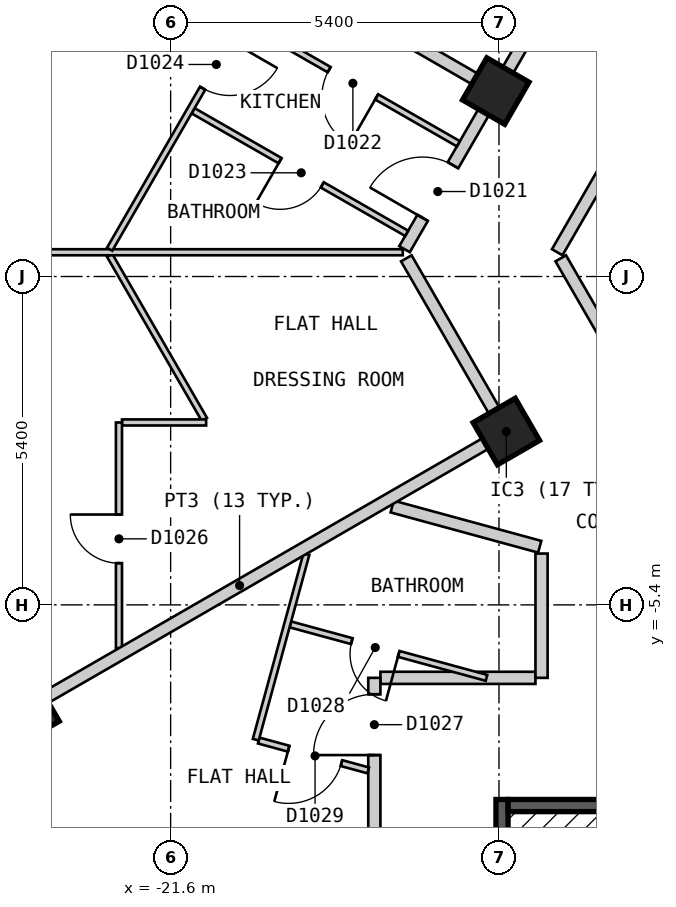
"""IFC4 building model, lengths in metres.
Left out: names, types, materials, properties, quantities, classifications, styles, units other than length and angle.
Written with IfcOpenShell. Run it as: python <this file> out.ifc"""

import sys

from ifc_helpers import new_model, si_unit, direction, frame, frame_2d, origin, origin_2d, place, context, subcontext, project, spatial, polyline, rectangle, outline, extrude, element, fill, save


model = new_model("IFC4")
c1 = context("Model", 3, precision=1e-05, world=origin(), true_north=direction((0.0, 1.0)))
c2 = subcontext(c1, "Body", "Model", "MODEL_VIEW")
j1 = project(units=[si_unit("LENGTHUNIT", "METRE"), si_unit("PLANEANGLEUNIT", "RADIAN")], contexts=[c1])
p1 = place(None, origin())
s1 = spatial("IfcSite", under=j1, at=p1, CompositionType="ELEMENT")
p2 = place(p1, origin())
s2 = spatial("IfcBuilding", under=s1, at=p2, CompositionType="ELEMENT")
p3 = place(p2, frame((0.0, 0.0, 120.6)))
s3 = spatial("IfcBuildingStorey", under=s2, at=p3, CompositionType="ELEMENT", Elevation=120.6)
p4 = place(p3, frame((-24.047, -7.149, 0.0), z_axis=(0.0, 0.0, 1.0), x_axis=(0.5, -0.866025403784, 0.0)))
e1 = element("IfcColumn", 1, at=p4, inside=s3, PredefinedType="COLUMN", context=c2, shape_type="SweptSolid", body=[
    extrude(rectangle(XDim=0.9, YDim=0.9, at=origin_2d()), origin(), (0.0, 0.0, 1.0), 3.0),
])
for number, where, z_axis, x_axis in (
    (2, (-16.079, -2.549, 0.0), (0.0, 0.0, 1.0), (0.5, -0.866, 0.0)),
    (3, (-16.253, 3.05, 0.0), (0.0, 0.0, 1.0), (-0.5, -0.866, 0.0)),
):
    element("IfcColumn", number, at=place(p3, frame(where, z_axis=z_axis, x_axis=x_axis)), inside=s3, PredefinedType="COLUMN", context=c2, shape_type="SweptSolid", body=[
        extrude(rectangle(XDim=0.8, YDim=0.8, at=origin_2d()), origin(), (0.0, 0.0, 1.0), 3.0),
    ])
p5 = place(p3, frame((-16.555, 23.025, 0.0), z_axis=(0.0, 0.0, 1.0), x_axis=(-0.500020536353, -0.866013546791, 0.0)))
e4 = element("IfcWall", 4, at=p5, inside=s3, PredefinedType="SOLIDWALL", context=c2, shape_type="SweptSolid", body=[
    extrude(outline(polyline([(0.0, -0.15), (23.325, -0.15), (23.245, 0.15), (0.08, 0.15), (0.0, -0.15)])), origin(), (0.0, 0.0, 1.0), 2.7),
])
p6 = place(p5, frame((1.314, 0.0, 0.15)))
e5 = element("IfcOpeningElement", 5, at=p6, cuts=e4, PredefinedType="OPENING", context=c2, shape_type="SweptSolid", body=[
    extrude(rectangle(XDim=1.5, YDim=2.1, at=frame_2d((0.75, 1.05))), frame((0.0, 0.16, 0.0), z_axis=(0.0, -1.0, 0.0), x_axis=(1.0, 0.0, 0.0)), (0.0, 0.0, 1.0), 0.32),
])
p7 = place(p5, frame((4.056, 0.0, 0.15)))
e6 = element("IfcOpeningElement", 6, at=p7, cuts=e4, PredefinedType="OPENING", context=c2, shape_type="SweptSolid", body=[
    extrude(rectangle(XDim=1.5, YDim=2.1, at=frame_2d((0.75, 1.05))), frame((0.0, 0.16, 0.0), z_axis=(0.0, -1.0, 0.0), x_axis=(1.0, 0.0, 0.0)), (0.0, 0.0, 1.0), 0.32),
])
p8 = place(p5, frame((6.799, 0.0, 0.15)))
e7 = element("IfcOpeningElement", 7, at=p8, cuts=e4, PredefinedType="OPENING", context=c2, shape_type="SweptSolid", body=[
    extrude(rectangle(XDim=1.5, YDim=2.1, at=frame_2d((0.75, 1.05))), frame((0.0, 0.16, 0.0), z_axis=(0.0, -1.0, 0.0), x_axis=(1.0, 0.0, 0.0)), (0.0, 0.0, 1.0), 0.32),
])
p9 = place(p5, frame((9.541, 0.0, 0.15)))
e8 = element("IfcOpeningElement", 8, at=p9, cuts=e4, PredefinedType="OPENING", context=c2, shape_type="SweptSolid", body=[
    extrude(rectangle(XDim=1.5, YDim=2.1, at=frame_2d((0.75, 1.05))), frame((0.0, 0.16, 0.0), z_axis=(0.0, -1.0, 0.0), x_axis=(1.0, 0.0, 0.0)), (0.0, 0.0, 1.0), 0.32),
])
p10 = place(p5, frame((12.285, 0.0, 0.15)))
e9 = element("IfcOpeningElement", 9, at=p10, cuts=e4, PredefinedType="OPENING", context=c2, shape_type="SweptSolid", body=[
    extrude(rectangle(XDim=1.5, YDim=2.1, at=frame_2d((0.75, 1.05))), frame((0.0, 0.16, 0.0), z_axis=(0.0, -1.0, 0.0), x_axis=(1.0, 0.0, 0.0)), (0.0, 0.0, 1.0), 0.32),
])
p11 = place(p5, frame((15.027, 0.0, 0.15)))
e10 = element("IfcOpeningElement", 10, at=p11, cuts=e4, PredefinedType="OPENING", context=c2, shape_type="SweptSolid", body=[
    extrude(rectangle(XDim=1.5, YDim=2.1, at=frame_2d((0.75, 1.05))), frame((0.0, 0.16, 0.0), z_axis=(0.0, -1.0, 0.0), x_axis=(1.0, 0.0, 0.0)), (0.0, 0.0, 1.0), 0.32),
])
p12 = place(p5, frame((17.769, 0.0, 0.15)))
e11 = element("IfcOpeningElement", 11, at=p12, cuts=e4, PredefinedType="OPENING", context=c2, shape_type="SweptSolid", body=[
    extrude(rectangle(XDim=1.5, YDim=2.1, at=frame_2d((0.75, 1.05))), frame((0.0, 0.16, 0.0), z_axis=(0.0, -1.0, 0.0), x_axis=(1.0, 0.0, 0.0)), (0.0, 0.0, 1.0), 0.32),
])
p13 = place(p5, frame((20.512, 0.0, 0.15)))
e12 = element("IfcOpeningElement", 12, at=p13, cuts=e4, PredefinedType="OPENING", context=c2, shape_type="SweptSolid", body=[
    extrude(rectangle(XDim=1.5, YDim=2.1, at=frame_2d((0.75, 1.05))), frame((0.0, 0.16, 0.0), z_axis=(0.0, -1.0, 0.0), x_axis=(1.0, 0.0, 0.0)), (0.0, 0.0, 1.0), 0.32),
])
p14 = place(p3, frame((-28.218, -2.025, 0.0), z_axis=(0.0, 0.0, 1.0), x_axis=(0.500017503135, -0.866015298109, 0.0)))
e13 = element("IfcWall", 13, at=p14, inside=s3, PredefinedType="SOLIDWALL", context=c2, shape_type="SweptSolid", body=[
    extrude(outline(polyline([(0.0, -0.15), (24.711, -0.15), (24.631, 0.15), (0.08, 0.15), (0.0, -0.15)])), origin(), (0.0, 0.0, 1.0), 2.7),
])
p15 = place(p14, frame((1.4, 0.0, 0.15)))
e14 = element("IfcOpeningElement", 14, at=p15, cuts=e13, PredefinedType="OPENING", context=c2, shape_type="SweptSolid", body=[
    extrude(rectangle(XDim=1.5, YDim=2.1, at=frame_2d((0.75, 1.05))), frame((0.0, 0.16, 0.0), z_axis=(0.0, -1.0, 0.0), x_axis=(1.0, 0.0, 0.0)), (0.0, 0.0, 1.0), 0.32),
])
p16 = place(p14, frame((4.316, 0.0, 0.15)))
e15 = element("IfcOpeningElement", 15, at=p16, cuts=e13, PredefinedType="OPENING", context=c2, shape_type="SweptSolid", body=[
    extrude(rectangle(XDim=1.5, YDim=2.1, at=frame_2d((0.75, 1.05))), frame((0.0, 0.16, 0.0), z_axis=(0.0, -1.0, 0.0), x_axis=(1.0, 0.0, 0.0)), (0.0, 0.0, 1.0), 0.32),
])
p17 = place(p14, frame((7.231, 0.0, 0.15)))
e16 = element("IfcOpeningElement", 16, at=p17, cuts=e13, PredefinedType="OPENING", context=c2, shape_type="SweptSolid", body=[
    extrude(rectangle(XDim=1.5, YDim=2.1, at=frame_2d((0.75, 1.05))), frame((0.0, 0.16, 0.0), z_axis=(0.0, -1.0, 0.0), x_axis=(1.0, 0.0, 0.0)), (0.0, 0.0, 1.0), 0.32),
])
p18 = place(p14, frame((10.147, 0.0, 0.15)))
e17 = element("IfcOpeningElement", 17, at=p18, cuts=e13, PredefinedType="OPENING", context=c2, shape_type="SweptSolid", body=[
    extrude(rectangle(XDim=1.5, YDim=2.1, at=frame_2d((0.75, 1.05))), frame((0.0, 0.16, 0.0), z_axis=(0.0, -1.0, 0.0), x_axis=(1.0, 0.0, 0.0)), (0.0, 0.0, 1.0), 0.32),
])
p19 = place(p14, frame((13.062, 0.0, 0.15)))
e18 = element("IfcOpeningElement", 18, at=p19, cuts=e13, PredefinedType="OPENING", context=c2, shape_type="SweptSolid", body=[
    extrude(rectangle(XDim=1.5, YDim=2.1, at=frame_2d((0.75, 1.05))), frame((0.0, 0.16, 0.0), z_axis=(0.0, -1.0, 0.0), x_axis=(1.0, 0.0, 0.0)), (0.0, 0.0, 1.0), 0.32),
])
p20 = place(p14, frame((15.977, 0.0, 0.15)))
e19 = element("IfcOpeningElement", 19, at=p20, cuts=e13, PredefinedType="OPENING", context=c2, shape_type="SweptSolid", body=[
    extrude(rectangle(XDim=1.5, YDim=2.1, at=frame_2d((0.75, 1.05))), frame((0.0, 0.16, 0.0), z_axis=(0.0, -1.0, 0.0), x_axis=(1.0, 0.0, 0.0)), (0.0, 0.0, 1.0), 0.32),
])
p21 = place(p14, frame((18.893, 0.0, 0.15)))
e20 = element("IfcOpeningElement", 20, at=p21, cuts=e13, PredefinedType="OPENING", context=c2, shape_type="SweptSolid", body=[
    extrude(rectangle(XDim=1.5, YDim=2.1, at=frame_2d((0.75, 1.05))), frame((0.0, 0.16, 0.0), z_axis=(0.0, -1.0, 0.0), x_axis=(1.0, 0.0, 0.0)), (0.0, 0.0, 1.0), 0.32),
])
p22 = place(p14, frame((21.809, 0.0, 0.15)))
e21 = element("IfcOpeningElement", 21, at=p22, cuts=e13, PredefinedType="OPENING", context=c2, shape_type="SweptSolid", body=[
    extrude(rectangle(XDim=1.5, YDim=2.1, at=frame_2d((0.75, 1.05))), frame((0.0, 0.16, 0.0), z_axis=(0.0, -1.0, 0.0), x_axis=(1.0, 0.0, 0.0)), (0.0, 0.0, 1.0), 0.32),
])
p23 = place(p3, frame((-15.184, 0.299, 0.0), z_axis=(0.0, 0.0, 1.0), x_axis=(0.500149577091, -0.865939028186, 0.0)))
e22 = element("IfcWall", 22, at=p23, inside=s3, PredefinedType="PARTITIONING", context=c2, shape_type="SweptSolid", body=[
    extrude(rectangle(XDim=3.463, YDim=0.2, at=frame_2d((1.732, 0.0))), origin(), (0.0, 0.0, 1.0), 2.7),
])
p24 = place(p3, frame((-17.724, 0.299, 0.0), z_axis=(0.0, 0.0, 1.0), x_axis=(0.499910220442, -0.866077231832, 0.0)))
e23 = element("IfcWall", 23, at=p24, inside=s3, PredefinedType="PARTITIONING", context=c2, shape_type="SweptSolid", body=[
    extrude(rectangle(XDim=3.189, YDim=0.2, at=frame_2d((1.594, 0.0))), origin(), (0.0, 0.0, 1.0), 2.7),
])
p25 = place(p3, frame((-18.15, -6.6, 0.0), z_axis=(0.0, 0.0, 1.0), x_axis=(1.0, 0.0, 0.0)))
e24 = element("IfcWall", 24, at=p25, inside=s3, PredefinedType="PARTITIONING", context=c2, shape_type="SweptSolid", body=[
    extrude(rectangle(XDim=2.55, YDim=0.2, at=frame_2d((1.275, 0.0))), origin(), (0.0, 0.0, 1.0), 2.7),
])
p26 = place(p3, frame((-15.242, 0.399, 0.0), z_axis=(0.0, 0.0, 1.0), x_axis=(0.499953615651, 0.866052182145, 0.0)))
e25 = element("IfcWall", 25, at=p26, inside=s3, PredefinedType="PARTITIONING", context=c2, shape_type="SweptSolid", body=[
    extrude(rectangle(XDim=8.777, YDim=0.2, at=frame_2d((4.388, 0.0))), origin(), (0.0, 0.0, 1.0), 2.7),
])
p27 = place(p26, frame((3.938, 0.0, 0.0)))
e26 = element("IfcOpeningElement", 26, at=p27, cuts=e25, PredefinedType="OPENING", context=c2, shape_type="SweptSolid", body=[
    extrude(rectangle(XDim=0.9, YDim=2.1, at=frame_2d((0.45, 1.05))), frame((0.0, 0.11, 0.0), z_axis=(0.0, -1.0, 0.0), x_axis=(1.0, 0.0, 0.0)), (0.0, 0.0, 1.0), 0.22),
])
p28 = place(p3, frame((-17.753, 0.45, 0.0), z_axis=(0.0, 0.0, 1.0), x_axis=(0.499990970252, 0.866030617049, 0.0)))
e27 = element("IfcWall", 27, at=p28, inside=s3, PredefinedType="PARTITIONING", context=c2, shape_type="SweptSolid", body=[
    extrude(rectangle(XDim=16.974, YDim=0.2, at=frame_2d((8.487, 0.0))), origin(), (0.0, 0.0, 1.0), 2.7),
])
p29 = place(p28, frame((10.73, 0.0, 0.0)))
e28 = element("IfcOpeningElement", 28, at=p29, cuts=e27, PredefinedType="OPENING", context=c2, shape_type="SweptSolid", body=[
    extrude(rectangle(XDim=1.0, YDim=2.1, at=frame_2d((0.5, 1.05))), frame((0.0, 0.11, 0.0), z_axis=(0.0, -1.0, 0.0), x_axis=(1.0, 0.0, 0.0)), (0.0, 0.0, 1.0), 0.22),
])
p30 = place(p28, frame((5.245, 0.0, 0.0)))
e29 = element("IfcOpeningElement", 29, at=p30, cuts=e27, PredefinedType="OPENING", context=c2, shape_type="SweptSolid", body=[
    extrude(rectangle(XDim=1.0, YDim=2.1, at=frame_2d((0.5, 1.05))), frame((0.0, 0.11, 0.0), z_axis=(0.0, -1.0, 0.0), x_axis=(1.0, 0.0, 0.0)), (0.0, 0.0, 1.0), 0.22),
])
p31 = place(p28, frame((0.594, 0.0, 0.0)))
e30 = element("IfcOpeningElement", 30, at=p31, cuts=e27, PredefinedType="OPENING", context=c2, shape_type="SweptSolid", body=[
    extrude(rectangle(XDim=1.0, YDim=2.1, at=frame_2d((0.5, 1.05))), frame((0.0, 0.11, 0.0), z_axis=(0.0, -1.0, 0.0), x_axis=(1.0, 0.0, 0.0)), (0.0, 0.0, 1.0), 0.22),
])
p32 = place(p3, frame((-15.5, -6.6, 0.0), z_axis=(0.0, 0.0, 1.0), x_axis=(0.0, 1.0, 0.0)))
e31 = element("IfcWall", 31, at=p32, inside=s3, PredefinedType="PARTITIONING", context=c2, shape_type="SweptSolid", body=[
    extrude(rectangle(XDim=2.044, YDim=0.2, at=frame_2d((1.022, 0.0))), origin(), (0.0, 0.0, 1.0), 2.7),
])
p33 = place(p3, frame((-18.25, -10.478, 0.0), z_axis=(0.0, 0.0, 1.0), x_axis=(0.0, 1.0, 0.0)))
e32 = element("IfcWall", 32, at=p33, inside=s3, PredefinedType="PARTITIONING", context=c2, shape_type="SweptSolid", body=[
    extrude(rectangle(XDim=3.878, YDim=0.2, at=frame_2d((1.939, 0.0))), origin(), (0.0, 0.0, 1.0), 2.7),
])
p34 = place(p33, frame((2.608, 0.0, 0.0)))
e33 = element("IfcOpeningElement", 33, at=p34, cuts=e32, PredefinedType="OPENING", context=c2, shape_type="SweptSolid", body=[
    extrude(rectangle(XDim=1.0, YDim=2.1, at=frame_2d((0.5, 1.05))), frame((0.0, 0.11, 0.0), z_axis=(0.0, -1.0, 0.0), x_axis=(1.0, 0.0, 0.0)), (0.0, 0.0, 1.0), 0.22),
])
p35 = place(p3, frame((-22.603, 0.349, 0.0), z_axis=(0.0, 0.0, 1.0), x_axis=(0.499930403552, -0.866065581584, 0.0)))
e34 = element("IfcWall", 34, at=p35, inside=s3, PredefinedType="PARTITIONING", context=c2, shape_type="SweptSolid", body=[
    extrude(rectangle(XDim=3.117, YDim=0.1, at=frame_2d((1.558, 0.0))), origin(), (0.0, 0.0, 1.0), 2.7),
])
p36 = place(p3, frame((-19.631, -5.721, 0.0), z_axis=(0.0, 0.0, 1.0), x_axis=(0.964816035809, -0.262925877475, 0.0)))
e35 = element("IfcWall", 35, at=p36, inside=s3, PredefinedType="PARTITIONING", context=c2, shape_type="SweptSolid", body=[
    extrude(rectangle(XDim=3.344, YDim=0.1, at=frame_2d((1.672, 0.0))), origin(), (0.0, 0.0, 1.0), 2.7),
])
p37 = place(p36, frame((1.047, 0.0, 0.0)))
e36 = element("IfcOpeningElement", 36, at=p37, cuts=e35, PredefinedType="OPENING", context=c2, shape_type="SweptSolid", body=[
    extrude(rectangle(XDim=0.8, YDim=2.1, at=frame_2d((0.4, 1.05))), frame((0.0, 0.06, 0.0), z_axis=(0.0, -1.0, 0.0), x_axis=(1.0, 0.0, 0.0)), (0.0, 0.0, 1.0), 0.12),
])
p38 = place(p3, frame((-20.151, -7.631, 0.0), z_axis=(0.0, 0.0, 1.0), x_axis=(0.964784947449, -0.263039930765, 0.0)))
e37 = element("IfcWall", 37, at=p38, inside=s3, PredefinedType="PARTITIONING", context=c2, shape_type="SweptSolid", body=[
    extrude(rectangle(XDim=1.866, YDim=0.1, at=frame_2d((0.933, 0.0))), origin(), (0.0, 0.0, 1.0), 2.7),
])
p39 = place(p38, frame((0.51, 0.0, 0.0)))
e38 = element("IfcOpeningElement", 38, at=p39, cuts=e37, PredefinedType="OPENING", context=c2, shape_type="SweptSolid", body=[
    extrude(rectangle(XDim=0.9, YDim=2.1, at=frame_2d((0.45, 1.05))), frame((0.0, 0.06, 0.0), z_axis=(0.0, -1.0, 0.0), x_axis=(1.0, 0.0, 0.0)), (0.0, 0.0, 1.0), 0.12),
])
p40 = place(p3, frame((-20.381, 4.198, 0.0), z_axis=(0.0, 0.0, 1.0), x_axis=(0.867459321792, -0.497508115549, 0.0)))
e39 = element("IfcWall", 39, at=p40, inside=s3, PredefinedType="PARTITIONING", context=c2, shape_type="SweptSolid", body=[
    extrude(rectangle(XDim=4.05, YDim=0.1, at=frame_2d((2.025, 0.0))), origin(), (0.0, 0.0, 1.0), 2.7),
])
p41 = place(p40, frame((1.6, 0.0, 0.0)))
e40 = element("IfcOpeningElement", 40, at=p41, cuts=e39, PredefinedType="OPENING", context=c2, shape_type="SweptSolid", body=[
    extrude(rectangle(XDim=0.9, YDim=2.1, at=frame_2d((0.45, 1.05))), frame((0.0, 0.06, 0.0), z_axis=(0.0, -1.0, 0.0), x_axis=(1.0, 0.0, 0.0)), (0.0, 0.0, 1.0), 0.12),
])
p42 = place(p3, frame((-21.231, 2.726, 0.0), z_axis=(0.0, 0.0, 1.0), x_axis=(0.867314299312, -0.497760892607, 0.0)))
e41 = element("IfcWall", 41, at=p42, inside=s3, PredefinedType="PARTITIONING", context=c2, shape_type="SweptSolid", body=[
    extrude(rectangle(XDim=4.05, YDim=0.1, at=frame_2d((2.025, 0.0))), origin(), (0.0, 0.0, 1.0), 2.7),
])
p43 = place(p42, frame((1.65, 0.0, 0.0)))
e42 = element("IfcOpeningElement", 42, at=p43, cuts=e41, PredefinedType="OPENING", context=c2, shape_type="SweptSolid", body=[
    extrude(rectangle(XDim=0.8, YDim=2.1, at=frame_2d((0.4, 1.05))), frame((0.0, 0.06, 0.0), z_axis=(0.0, -1.0, 0.0), x_axis=(1.0, 0.0, 0.0)), (0.0, 0.0, 1.0), 0.12),
])
p44 = place(p3, frame((-22.4, -2.4, 0.0), z_axis=(0.0, 0.0, 1.0), x_axis=(1.0, 0.0, 0.0)))
e43 = element("IfcWall", 43, at=p44, inside=s3, PredefinedType="PARTITIONING", context=c2, shape_type="SweptSolid", body=[
    extrude(rectangle(XDim=1.384, YDim=0.1, at=frame_2d((0.692, 0.0))), origin(), (0.0, 0.0, 1.0), 2.7),
])
p45 = place(p3, frame((-28.048, 0.399, 0.0), z_axis=(0.0, 0.0, 1.0), x_axis=(1.0, 0.0, 0.0)))
e44 = element("IfcWall", 44, at=p45, inside=s3, PredefinedType="PARTITIONING", context=c2, shape_type="SweptSolid", body=[
    extrude(rectangle(XDim=10.266, YDim=0.1, at=frame_2d((5.133, 0.0))), origin(), (0.0, 0.0, 1.0), 2.7),
])
p46 = place(p45, frame((2.258, 0.0, 0.0)))
e45 = element("IfcOpeningElement", 45, at=p46, cuts=e44, PredefinedType="OPENING", context=c2, shape_type="SweptSolid", body=[
    extrude(rectangle(XDim=0.9, YDim=2.1, at=frame_2d((0.45, 1.05))), frame((0.0, 0.06, 0.0), z_axis=(0.0, -1.0, 0.0), x_axis=(1.0, 0.0, 0.0)), (0.0, 0.0, 1.0), 0.12),
])
p47 = place(p3, frame((-22.603, 0.449, 0.0), z_axis=(0.0, 0.0, 1.0), x_axis=(0.500022588228, 0.866012362072, 0.0)))
e46 = element("IfcWall", 46, at=p47, inside=s3, PredefinedType="PARTITIONING", context=c2, shape_type="SweptSolid", body=[
    extrude(rectangle(XDim=5.328, YDim=0.1, at=frame_2d((2.664, 0.0))), origin(), (0.0, 0.0, 1.0), 2.7),
])
p48 = place(p47, frame((3.058, 0.0, 0.0)))
e47 = element("IfcOpeningElement", 47, at=p48, cuts=e46, PredefinedType="OPENING", context=c2, shape_type="SweptSolid", body=[
    extrude(rectangle(XDim=0.9, YDim=2.1, at=frame_2d((0.45, 1.05))), frame((0.0, 0.06, 0.0), z_axis=(0.0, -1.0, 0.0), x_axis=(1.0, 0.0, 0.0)), (0.0, 0.0, 1.0), 0.12),
])
p49 = place(p3, frame((-20.2, -7.617, 0.0), z_axis=(0.0, 0.0, 1.0), x_axis=(0.263150035392, 0.964754921663, 0.0)))
e48 = element("IfcWall", 48, at=p49, inside=s3, PredefinedType="PARTITIONING", context=c2, shape_type="SweptSolid", body=[
    extrude(rectangle(XDim=3.166, YDim=0.1, at=frame_2d((1.583, 0.0))), origin(), (0.0, 0.0, 1.0), 2.7),
])
p50 = place(p3, frame((-22.45, -6.112, 0.0), z_axis=(0.0, 0.0, 1.0), x_axis=(0.0, 1.0, 0.0)))
e49 = element("IfcWall", 49, at=p50, inside=s3, PredefinedType="PARTITIONING", context=c2, shape_type="SweptSolid", body=[
    extrude(rectangle(XDim=3.712, YDim=0.1, at=frame_2d((1.856, 0.0))), origin(), (0.0, 0.0, 1.0), 2.7),
])
p51 = place(p50, frame((1.398, 0.0, 0.0)))
e50 = element("IfcOpeningElement", 50, at=p51, cuts=e49, PredefinedType="OPENING", context=c2, shape_type="SweptSolid", body=[
    extrude(rectangle(XDim=0.8, YDim=2.1, at=frame_2d((0.4, 1.05))), frame((0.0, 0.06, 0.0), z_axis=(0.0, -1.0, 0.0), x_axis=(1.0, 0.0, 0.0)), (0.0, 0.0, 1.0), 0.12),
])
p52 = place(p3, frame((-17.956, -3.783, 0.0), z_axis=(0.0, 0.0, 1.0), x_axis=(0.964815336827, -0.2629284424, 0.0)))
e51 = element("IfcWall", 51, at=p52, inside=s3, PredefinedType="PARTITIONING", context=c2, shape_type="SweptSolid", body=[
    extrude(rectangle(XDim=2.514, YDim=0.2, at=frame_2d((1.257, 0.0))), origin(), (0.0, 0.0, 1.0), 2.7),
])
p53 = place(p3, frame((-24.999, 8.1, 0.0), z_axis=(0.0, 0.0, 1.0), x_axis=(0.866016855193, -0.500014806302, 0.0)))
e52 = element("IfcWall", 52, at=p53, inside=s3, PredefinedType="PARTITIONING", context=c2, shape_type="SweptSolid", body=[
    extrude(rectangle(XDim=10.0, YDim=0.2, at=frame_2d((5.0, 0.0))), origin(), (0.0, 0.0, 1.0), 2.7),
])
p54 = place(p3, frame((-24.826, -7.599, 0.0), z_axis=(0.0, 0.0, 1.0), x_axis=(0.86599621094, 0.500050560081, 0.0)))
e53 = element("IfcWall", 53, at=p54, inside=s3, PredefinedType="PARTITIONING", context=c2, shape_type="SweptSolid", body=[
    extrude(rectangle(XDim=10.069, YDim=0.2, at=frame_2d((5.035, 0.0))), origin(), (0.0, 0.0, 1.0), 2.7),
])
p55 = place(p3, frame((-16.15, -14.4, 0.0), z_axis=(0.0, 0.0, 1.0), x_axis=(0.0, 1.0, 0.0)))
e54 = element("IfcWall", 54, at=p55, inside=s3, PredefinedType="SOLIDWALL", context=c2, shape_type="SweptSolid", body=[
    extrude(rectangle(XDim=5.8, YDim=0.2, at=frame_2d((2.9, 0.0))), origin(), (0.0, 0.0, 1.0), 2.7),
])
p56 = place(p3, frame((-16.05, -8.7, 0.0), z_axis=(0.0, 0.0, 1.0), x_axis=(1.0, 0.0, 0.0)))
e55 = element("IfcWall", 55, at=p56, inside=s3, PredefinedType="SOLIDWALL", context=c2, shape_type="SweptSolid", body=[
    extrude(rectangle(XDim=2.75, YDim=0.2, at=frame_2d((1.375, 0.0))), origin(), (0.0, 0.0, 1.0), 2.7),
])
p57 = place(p31, origin())
e56 = element("IfcDoor", 56, at=p57, inside=s3, OperationType="SINGLE_SWING_LEFT", PredefinedType="DOOR", context=c2, shape_type="SweptSolid", body=[
    extrude(rectangle(XDim=1.0, YDim=2.1, at=frame_2d((0.5, 1.05))), frame((0.0, 0.025, 0.0), z_axis=(0.0, -1.0, 0.0), x_axis=(1.0, 0.0, 0.0)), (0.0, 0.0, 1.0), 0.05),
])
fill(e30, e56)
p58 = place(p41, origin())
e57 = element("IfcDoor", 57, at=p58, inside=s3, OperationType="SINGLE_SWING_RIGHT", PredefinedType="DOOR", context=c2, shape_type="SweptSolid", body=[
    extrude(rectangle(XDim=0.9, YDim=2.1, at=frame_2d((0.45, 1.05))), frame((0.0, 0.025, 0.0), z_axis=(0.0, -1.0, 0.0), x_axis=(1.0, 0.0, 0.0)), (0.0, 0.0, 1.0), 0.05),
])
fill(e40, e57)
p59 = place(p43, origin())
e58 = element("IfcDoor", 58, at=p59, inside=s3, OperationType="SINGLE_SWING_LEFT", PredefinedType="DOOR", context=c2, shape_type="SweptSolid", body=[
    extrude(rectangle(XDim=0.8, YDim=2.1, at=frame_2d((0.4, 1.05))), frame((0.0, 0.025, 0.0), z_axis=(0.0, -1.0, 0.0), x_axis=(1.0, 0.0, 0.0)), (0.0, 0.0, 1.0), 0.05),
])
fill(e42, e58)
p60 = place(p48, origin())
e59 = element("IfcDoor", 59, at=p60, inside=s3, OperationType="SINGLE_SWING_RIGHT", PredefinedType="DOOR", context=c2, shape_type="SweptSolid", body=[
    extrude(rectangle(XDim=0.9, YDim=2.1, at=frame_2d((0.45, 1.05))), frame((0.0, 0.025, 0.0), z_axis=(0.0, -1.0, 0.0), x_axis=(1.0, 0.0, 0.0)), (0.0, 0.0, 1.0), 0.05),
])
fill(e47, e59)
p61 = place(p51, origin())
e60 = element("IfcDoor", 60, at=p61, inside=s3, OperationType="SINGLE_SWING_RIGHT", PredefinedType="DOOR", context=c2, shape_type="SweptSolid", body=[
    extrude(rectangle(XDim=0.8, YDim=2.1, at=frame_2d((0.4, 1.05))), frame((0.0, 0.025, 0.0), z_axis=(0.0, -1.0, 0.0), x_axis=(1.0, 0.0, 0.0)), (0.0, 0.0, 1.0), 0.05),
])
fill(e50, e60)
p62 = place(p34, origin())
e61 = element("IfcDoor", 61, at=p62, inside=s3, OperationType="SINGLE_SWING_LEFT", PredefinedType="DOOR", context=c2, shape_type="SweptSolid", body=[
    extrude(rectangle(XDim=1.0, YDim=2.1, at=frame_2d((0.5, 1.05))), frame((0.0, 0.025, 0.0), z_axis=(0.0, -1.0, 0.0), x_axis=(1.0, 0.0, 0.0)), (0.0, 0.0, 1.0), 0.05),
])
fill(e33, e61)
p63 = place(p37, origin())
e62 = element("IfcDoor", 62, at=p63, inside=s3, OperationType="SINGLE_SWING_RIGHT", PredefinedType="DOOR", context=c2, shape_type="SweptSolid", body=[
    extrude(rectangle(XDim=0.8, YDim=2.1, at=frame_2d((0.4, 1.05))), frame((0.0, 0.025, 0.0), z_axis=(0.0, -1.0, 0.0), x_axis=(1.0, 0.0, 0.0)), (0.0, 0.0, 1.0), 0.05),
])
fill(e36, e62)
p64 = place(p39, origin())
e63 = element("IfcDoor", 63, at=p64, inside=s3, OperationType="SINGLE_SWING_LEFT", PredefinedType="DOOR", context=c2, shape_type="SweptSolid", body=[
    extrude(rectangle(XDim=0.9, YDim=2.1, at=frame_2d((0.45, 1.05))), frame((0.0, 0.025, 0.0), z_axis=(0.0, -1.0, 0.0), x_axis=(1.0, 0.0, 0.0)), (0.0, 0.0, 1.0), 0.05),
])
fill(e38, e63)
save(model, sys.argv[1])
